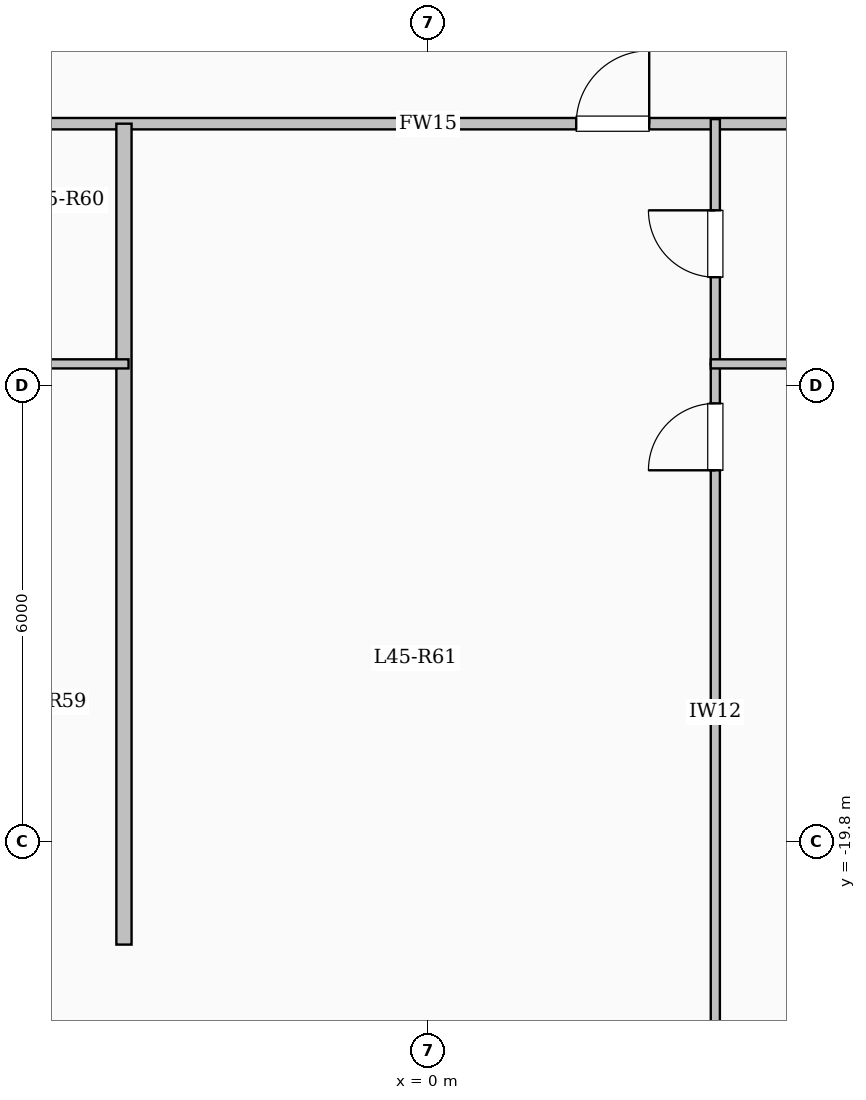
"""IFC4 building model, lengths in metres.
Left out: names, types, materials, properties, quantities, classifications, styles, units other than length and angle.
Written with IfcOpenShell. Run it as: python <this file> out.ifc"""

import sys

from ifc_helpers import new_model, si_unit, direction, frame, frame_2d, origin, place, context, subcontext, project, spatial, rectangle, extrude, element, fill, save


model = new_model("IFC4")
c1 = context("Model", 3, precision=1e-05, world=origin(), true_north=direction((0.0, 1.0)))
c2 = subcontext(c1, "Body", "Model", "MODEL_VIEW")
j1 = project(units=[si_unit("LENGTHUNIT", "METRE"), si_unit("PLANEANGLEUNIT", "RADIAN")], contexts=[c1])
p1 = place(None, origin())
s1 = spatial("IfcSite", under=j1, at=p1, CompositionType="ELEMENT")
p2 = place(p1, origin())
s2 = spatial("IfcBuilding", under=s1, at=p2, CompositionType="ELEMENT")
p3 = place(p2, frame((0.0, 0.0, 166.1)))
s3 = spatial("IfcBuildingStorey", under=s2, at=p3, CompositionType="ELEMENT", Elevation=166.1)
p4 = place(p3, frame((7.35, -21.15, 0.0), z_axis=(0.0, 0.0, 1.0), x_axis=(-0.894427191, -0.4472135955, 0.0)))
e1 = element("IfcWall", 1, at=p4, inside=s3, PredefinedType="SOLIDWALL", context=c2, shape_type="SweptSolid", body=[
    extrude(rectangle(XDim=3.354, YDim=0.28, at=frame_2d((1.677, 0.0))), origin(), (0.0, 0.0, 1.0), 3.1),
])
p5 = place(p4, frame((0.501, 0.0, 0.95)))
e2 = element("IfcOpeningElement", 2, at=p5, cuts=e1, PredefinedType="OPENING", context=c2, shape_type="SweptSolid", body=[
    extrude(rectangle(XDim=1.2, YDim=1.5, at=frame_2d((0.6, 0.75))), frame((0.0, 0.15, 0.0), z_axis=(0.0, -1.0, 0.0), x_axis=(1.0, 0.0, 0.0)), (0.0, 0.0, 1.0), 0.3),
])
p6 = place(p3, frame((-4.35, -22.65, 0.0), z_axis=(0.0, 0.0, 1.0), x_axis=(-0.894427191, 0.4472135955, 0.0)))
e3 = element("IfcWall", 3, at=p6, inside=s3, PredefinedType="SOLIDWALL", context=c2, shape_type="SweptSolid", body=[
    extrude(rectangle(XDim=3.354, YDim=0.28, at=frame_2d((1.677, 0.0))), origin(), (0.0, 0.0, 1.0), 3.1),
])
p7 = place(p6, frame((2.124, 0.0, 0.95)))
e4 = element("IfcOpeningElement", 4, at=p7, cuts=e3, PredefinedType="OPENING", context=c2, shape_type="SweptSolid", body=[
    extrude(rectangle(XDim=0.85, YDim=1.5, at=frame_2d((0.425, 0.75))), frame((0.0, 0.15, 0.0), z_axis=(0.0, -1.0, 0.0), x_axis=(1.0, 0.0, 0.0)), (0.0, 0.0, 1.0), 0.3),
])
p8 = place(p3, frame((-8.55, -10.35, 0.0), z_axis=(0.0, 0.0, 1.0), x_axis=(1.0, 0.0, 0.0)))
e5 = element("IfcWall", 5, at=p8, inside=s3, PredefinedType="PARTITIONING", context=c2, shape_type="SweptSolid", body=[
    extrude(rectangle(XDim=17.1, YDim=0.15, at=frame_2d((8.55, 0.0))), origin(), (0.0, 0.0, 1.0), 3.1),
])
p9 = place(p8, frame((1.15, 0.0, 0.0)))
e6 = element("IfcOpeningElement", 6, at=p9, cuts=e5, PredefinedType="OPENING", context=c2, shape_type="SweptSolid", body=[
    extrude(rectangle(XDim=0.96, YDim=2.15, at=frame_2d((0.48, 1.075))), frame((0.0, 0.085, 0.0), z_axis=(0.0, -1.0, 0.0), x_axis=(1.0, 0.0, 0.0)), (0.0, 0.0, 1.0), 0.17),
])
p10 = place(p8, frame((10.5, 0.0, 0.0)))
e7 = element("IfcOpeningElement", 7, at=p10, cuts=e5, PredefinedType="OPENING", context=c2, shape_type="SweptSolid", body=[
    extrude(rectangle(XDim=0.96, YDim=2.15, at=frame_2d((0.48, 1.075))), frame((0.0, 0.085, 0.0), z_axis=(0.0, -1.0, 0.0), x_axis=(1.0, 0.0, 0.0)), (0.0, 0.0, 1.0), 0.17),
])
p11 = place(p3, frame((-4.0, -21.15, 0.0), z_axis=(0.0, 0.0, 1.0), x_axis=(0.0, 1.0, 0.0)))
e8 = element("IfcWall", 8, at=p11, inside=s3, PredefinedType="SOLIDWALL", context=c2, shape_type="SweptSolid", body=[
    extrude(rectangle(XDim=10.8, YDim=0.2, at=frame_2d((5.4, 0.0))), origin(), (0.0, 0.0, 1.0), 3.1),
])
p12 = place(p3, frame((-6.14, -13.51, 0.0), z_axis=(0.0, 0.0, 1.0), x_axis=(1.0, 0.0, 0.0)))
e9 = element("IfcWall", 9, at=p12, inside=s3, PredefinedType="PARTITIONING", context=c2, shape_type="SweptSolid", body=[
    extrude(rectangle(XDim=2.2, YDim=0.12, at=frame_2d((1.1, 0.0))), origin(), (0.0, 0.0, 1.0), 3.1),
])
p13 = place(p3, frame((3.78, -22.68, 0.0), z_axis=(0.0, 0.0, 1.0), x_axis=(0.0, 1.0, 0.0)))
e10 = element("IfcWall", 10, at=p13, inside=s3, PredefinedType="PARTITIONING", context=c2, shape_type="SweptSolid", body=[
    extrude(rectangle(XDim=9.17, YDim=0.12, at=frame_2d((4.585, 0.0))), origin(), (0.0, 0.0, 1.0), 3.1),
])
p14 = place(p13, frame((7.77, 0.0, 0.0)))
e11 = element("IfcOpeningElement", 11, at=p14, cuts=e10, PredefinedType="OPENING", context=c2, shape_type="SweptSolid", body=[
    extrude(rectangle(XDim=0.88, YDim=2.1, at=frame_2d((0.44, 1.05))), frame((0.0, 0.07, 0.0), z_axis=(0.0, -1.0, 0.0), x_axis=(1.0, 0.0, 0.0)), (0.0, 0.0, 1.0), 0.14),
])
p15 = place(p3, frame((3.78, -13.51, 0.0), z_axis=(0.0, 0.0, 1.0), x_axis=(0.0, 1.0, 0.0)))
e12 = element("IfcWall", 12, at=p15, inside=s3, PredefinedType="PARTITIONING", context=c2, shape_type="SweptSolid", body=[
    extrude(rectangle(XDim=3.22, YDim=0.12, at=frame_2d((1.61, 0.0))), origin(), (0.0, 0.0, 1.0), 3.1),
])
p16 = place(p15, frame((1.14, 0.0, 0.0)))
e13 = element("IfcOpeningElement", 13, at=p16, cuts=e12, PredefinedType="OPENING", context=c2, shape_type="SweptSolid", body=[
    extrude(rectangle(XDim=0.88, YDim=2.1, at=frame_2d((0.44, 1.05))), frame((0.0, 0.07, 0.0), z_axis=(0.0, -1.0, 0.0), x_axis=(1.0, 0.0, 0.0)), (0.0, 0.0, 1.0), 0.14),
])
p17 = place(p3, frame((3.72, -13.51, 0.0), z_axis=(0.0, 0.0, 1.0), x_axis=(1.0, 0.0, 0.0)))
e14 = element("IfcWall", 14, at=p17, inside=s3, PredefinedType="PARTITIONING", context=c2, shape_type="SweptSolid", body=[
    extrude(rectangle(XDim=4.89, YDim=0.12, at=frame_2d((2.445, 0.0))), origin(), (0.0, 0.0, 1.0), 3.1),
])
p18 = place(p10, origin())
e15 = element("IfcDoor", 15, at=p18, inside=s3, OperationType="SINGLE_SWING_RIGHT", PredefinedType="DOOR", context=c2, shape_type="SweptSolid", body=[
    extrude(rectangle(XDim=0.96, YDim=2.15, at=frame_2d((0.48, 1.075))), frame((0.0, 0.025, 0.0), z_axis=(0.0, -1.0, 0.0), x_axis=(1.0, 0.0, 0.0)), (0.0, 0.0, 1.0), 0.05),
])
fill(e7, e15)
p19 = place(p14, origin())
e16 = element("IfcDoor", 16, at=p19, inside=s3, OperationType="SINGLE_SWING_LEFT", PredefinedType="DOOR", context=c2, shape_type="SweptSolid", body=[
    extrude(rectangle(XDim=0.88, YDim=2.1, at=frame_2d((0.44, 1.05))), frame((0.0, 0.025, 0.0), z_axis=(0.0, -1.0, 0.0), x_axis=(1.0, 0.0, 0.0)), (0.0, 0.0, 1.0), 0.05),
])
fill(e11, e16)
p20 = place(p16, origin())
e17 = element("IfcDoor", 17, at=p20, inside=s3, OperationType="SINGLE_SWING_RIGHT", PredefinedType="DOOR", context=c2, shape_type="SweptSolid", body=[
    extrude(rectangle(XDim=0.88, YDim=2.1, at=frame_2d((0.44, 1.05))), frame((0.0, 0.025, 0.0), z_axis=(0.0, -1.0, 0.0), x_axis=(1.0, 0.0, 0.0)), (0.0, 0.0, 1.0), 0.05),
])
fill(e13, e17)
save(model, sys.argv[1])
